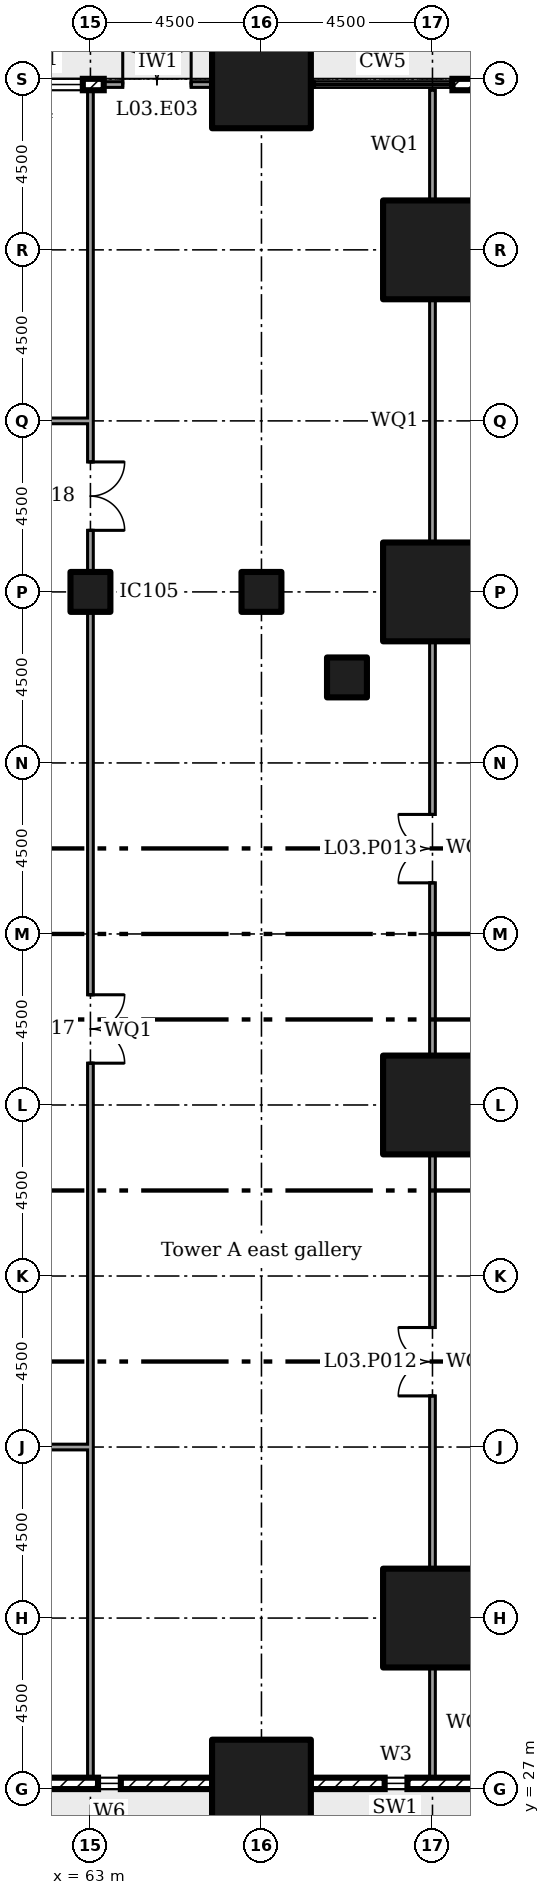
"""IFC4 building model, lengths in metres.
Left out: names, types, materials, properties, quantities, classifications, styles, units other than length and angle.
Written with IfcOpenShell. Run it as: python <this file> out.ifc"""

import sys

from ifc_helpers import new_model, si_unit, direction, frame, frame_2d, origin, origin_2d, place, context, subcontext, project, spatial, rectangle, extrude, element, fill, save


model = new_model("IFC4")
c1 = context("Model", 3, precision=1e-05, world=origin(), true_north=direction((0.0, 1.0)))
c2 = subcontext(c1, "Body", "Model", "MODEL_VIEW")
j1 = project(units=[si_unit("LENGTHUNIT", "METRE"), si_unit("PLANEANGLEUNIT", "RADIAN")], contexts=[c1])
p1 = place(None, origin())
s1 = spatial("IfcSite", under=j1, at=p1, CompositionType="ELEMENT")
p2 = place(p1, origin())
s2 = spatial("IfcBuilding", under=s1, at=p2, CompositionType="ELEMENT")
p3 = place(p2, frame((0.0, 0.0, 16.5)))
s3 = spatial("IfcBuildingStorey", under=s2, at=p3, CompositionType="ELEMENT", Elevation=16.5)
for number, where in (
    (1, (67.5, 27.0, 0.0)),
    (2, (67.5, 72.0, 0.0)),
    (3, (72.0, 31.5, 0.0)),
    (4, (72.0, 45.0, 0.0)),
    (5, (72.0, 58.5, 0.0)),
    (6, (72.0, 67.5, 0.0)),
):
    element("IfcColumn", number, at=place(p3, frame(where)), inside=s3, PredefinedType="COLUMN", context=c2, shape_type="SweptSolid", body=[
        extrude(rectangle(XDim=2.6, YDim=2.6, at=origin_2d()), origin(), (0.0, 0.0, 1.0), 4.5),
    ])
for number, where in (
    (7, (63.0, 58.5, 0.0)),
    (8, (67.5, 58.5, 0.0)),
    (9, (69.75, 56.25, 0.0)),
):
    element("IfcColumn", number, at=place(p3, frame(where)), inside=s3, PredefinedType="COLUMN", context=c2, shape_type="SweptSolid", body=[
        extrude(rectangle(XDim=1.05, YDim=1.05, at=origin_2d()), origin(), (0.0, 0.0, 1.0), 4.5),
    ])
p4 = place(p3, frame((59.8, 27.15, 0.0)))
e10 = element("IfcWall", 10, at=p4, inside=s3, PredefinedType="ELEMENTEDWALL", context=c2, shape_type="SweptSolid", body=[
    extrude(rectangle(XDim=6.4, YDim=0.3, at=frame_2d((3.2, 0.0))), origin(), (0.0, 0.0, 1.0), 2.25),
])
p5 = place(p4, frame((3.4, 0.0, 0.45)))
e11 = element("IfcOpeningElement", 11, at=p5, cuts=e10, PredefinedType="OPENING", context=c2, shape_type="SweptSolid", body=[
    extrude(rectangle(XDim=0.6, YDim=1.7, at=frame_2d((0.3, 0.85))), frame((0.0, 0.16, 0.0), z_axis=(0.0, -1.0, 0.0), x_axis=(1.0, 0.0, 0.0)), (0.0, 0.0, 1.0), 0.32),
])
p6 = place(p3, frame((68.8, 27.15, 0.0)))
e12 = element("IfcWall", 12, at=p6, inside=s3, PredefinedType="ELEMENTEDWALL", context=c2, shape_type="SweptSolid", body=[
    extrude(rectangle(XDim=4.433, YDim=0.3, at=frame_2d((2.217, 0.0))), origin(), (0.0, 0.0, 1.0), 4.05),
])
p7 = place(p6, frame((1.942, 0.0, 0.45)))
e13 = element("IfcOpeningElement", 13, at=p7, cuts=e12, PredefinedType="OPENING", context=c2, shape_type="SweptSolid", body=[
    extrude(rectangle(XDim=0.6, YDim=2.4, at=frame_2d((0.3, 1.2))), frame((0.0, 0.16, 0.0), z_axis=(0.0, -1.0, 0.0), x_axis=(1.0, 0.0, 0.0)), (0.0, 0.0, 1.0), 0.32),
])
p8 = place(p3, frame((76.2, 71.85, 0.0), z_axis=(0.0, 0.0, 1.0), x_axis=(-1.0, 0.0, 0.0)))
e14 = element("IfcWall", 14, at=p8, inside=s3, PredefinedType="ELEMENTEDWALL", context=c2, shape_type="SweptSolid", body=[
    extrude(rectangle(XDim=3.675, YDim=0.3, at=frame_2d((1.837, 0.0))), origin(), (0.0, 0.0, 1.0), 4.05),
])
p9 = place(p8, frame((1.538, 0.0, 0.45)))
e15 = element("IfcOpeningElement", 15, at=p9, cuts=e14, PredefinedType="OPENING", context=c2, shape_type="SweptSolid", body=[
    extrude(rectangle(XDim=0.6, YDim=2.4, at=frame_2d((0.3, 1.2))), frame((0.0, 0.16, 0.0), z_axis=(0.0, -1.0, 0.0), x_axis=(1.0, 0.0, 0.0)), (0.0, 0.0, 1.0), 0.32),
])
p10 = place(p3, frame((66.2, 71.85, 0.0), z_axis=(0.0, 0.0, 1.0), x_axis=(-1.0, 0.0, 0.0)))
e16 = element("IfcWall", 16, at=p10, inside=s3, PredefinedType="SOLIDWALL", context=c2, shape_type="SweptSolid", body=[
    extrude(rectangle(XDim=2.85, YDim=0.15, at=frame_2d((1.425, 0.0))), origin(), (0.0, 0.0, 1.0), 2.25),
])
p11 = place(p10, frame((0.55, 0.0, 0.0)))
e17 = element("IfcOpeningElement", 17, at=p11, cuts=e16, PredefinedType="OPENING", context=c2, shape_type="SweptSolid", body=[
    extrude(rectangle(XDim=1.8, YDim=2.1, at=frame_2d((0.9, 1.05))), frame((0.0, 0.085, 0.0), z_axis=(0.0, -1.0, 0.0), x_axis=(1.0, 0.0, 0.0)), (0.0, 0.0, 1.0), 0.17),
])
p12 = place(p3, frame((63.35, 71.85, 0.0), z_axis=(0.0, 0.0, 1.0), x_axis=(-1.0, 0.0, 0.0)))
e18 = element("IfcWall", 18, at=p12, inside=s3, PredefinedType="ELEMENTEDWALL", context=c2, shape_type="SweptSolid", body=[
    extrude(rectangle(XDim=3.55, YDim=0.3, at=frame_2d((1.775, 0.0))), origin(), (0.0, 0.0, 1.0), 2.25),
])
p13 = place(p12, frame((0.55, 0.0, 0.45)))
e19 = element("IfcOpeningElement", 19, at=p13, cuts=e18, PredefinedType="OPENING", context=c2, shape_type="SweptSolid", body=[
    extrude(rectangle(XDim=2.4, YDim=1.7, at=frame_2d((1.2, 0.85))), frame((0.0, 0.16, 0.0), z_axis=(0.0, -1.0, 0.0), x_axis=(1.0, 0.0, 0.0)), (0.0, 0.0, 1.0), 0.32),
])
p14 = place(p3, frame((72.0, 27.3, 0.0), z_axis=(0.0, 0.0, 1.0), x_axis=(0.0, 1.0, 0.0)))
e20 = element("IfcWall", 20, at=p14, inside=s3, PredefinedType="PARTITIONING", context=c2, shape_type="SweptSolid", body=[
    extrude(rectangle(XDim=2.905, YDim=0.15, at=frame_2d((1.453, 0.0))), origin(), (0.0, 0.0, 1.0), 4.05),
])
p15 = place(p3, frame((72.0, 32.795, 0.0), z_axis=(0.0, 0.0, 1.0), x_axis=(0.0, 1.0, 0.0)))
e21 = element("IfcWall", 21, at=p15, inside=s3, PredefinedType="PARTITIONING", context=c2, shape_type="SweptSolid", body=[
    extrude(rectangle(XDim=10.91, YDim=0.15, at=frame_2d((5.455, 0.0))), origin(), (0.0, 0.0, 1.0), 2.25),
])
p16 = place(p15, frame((4.55, 0.0, 0.0)))
e22 = element("IfcOpeningElement", 22, at=p16, cuts=e21, PredefinedType="OPENING", context=c2, shape_type="SweptSolid", body=[
    extrude(rectangle(XDim=1.8, YDim=2.1, at=frame_2d((0.9, 1.05))), frame((0.0, 0.085, 0.0), z_axis=(0.0, -1.0, 0.0), x_axis=(1.0, 0.0, 0.0)), (0.0, 0.0, 1.0), 0.17),
])
p17 = place(p3, frame((72.0, 46.295, 0.0), z_axis=(0.0, 0.0, 1.0), x_axis=(0.0, 1.0, 0.0)))
e23 = element("IfcWall", 23, at=p17, inside=s3, PredefinedType="PARTITIONING", context=c2, shape_type="SweptSolid", body=[
    extrude(rectangle(XDim=10.91, YDim=0.15, at=frame_2d((5.455, 0.0))), origin(), (0.0, 0.0, 1.0), 2.25),
])
p18 = place(p17, frame((4.55, 0.0, 0.0)))
e24 = element("IfcOpeningElement", 24, at=p18, cuts=e23, PredefinedType="OPENING", context=c2, shape_type="SweptSolid", body=[
    extrude(rectangle(XDim=1.8, YDim=2.1, at=frame_2d((0.9, 1.05))), frame((0.0, 0.085, 0.0), z_axis=(0.0, -1.0, 0.0), x_axis=(1.0, 0.0, 0.0)), (0.0, 0.0, 1.0), 0.17),
])
p19 = place(p3, frame((72.0, 59.795, 0.0), z_axis=(0.0, 0.0, 1.0), x_axis=(0.0, 1.0, 0.0)))
e25 = element("IfcWall", 25, at=p19, inside=s3, PredefinedType="PARTITIONING", context=c2, shape_type="SweptSolid", body=[
    extrude(rectangle(XDim=6.41, YDim=0.15, at=frame_2d((3.205, 0.0))), origin(), (0.0, 0.0, 1.0), 2.25),
])
p20 = place(p3, frame((72.0, 68.795, 0.0), z_axis=(0.0, 0.0, 1.0), x_axis=(0.0, 1.0, 0.0)))
e26 = element("IfcWall", 26, at=p20, inside=s3, PredefinedType="PARTITIONING", context=c2, shape_type="SweptSolid", body=[
    extrude(rectangle(XDim=2.905, YDim=0.15, at=frame_2d((1.453, 0.0))), origin(), (0.0, 0.0, 1.0), 4.05),
])
p21 = place(p3, frame((63.0, 35.925, 0.0), z_axis=(0.0, 0.0, 1.0), x_axis=(0.0, 1.0, 0.0)))
e27 = element("IfcWall", 27, at=p21, inside=s3, PredefinedType="PARTITIONING", context=c2, shape_type="SweptSolid", body=[
    extrude(rectangle(XDim=22.055, YDim=0.15, at=frame_2d((11.027, 0.0))), origin(), (0.0, 0.0, 1.0), 4.05),
])
p22 = place(p21, frame((10.175, 0.0, 0.0)))
e28 = element("IfcOpeningElement", 28, at=p22, cuts=e27, PredefinedType="OPENING", context=c2, shape_type="SweptSolid", body=[
    extrude(rectangle(XDim=1.8, YDim=2.1, at=frame_2d((0.9, 1.05))), frame((0.0, 0.085, 0.0), z_axis=(0.0, -1.0, 0.0), x_axis=(1.0, 0.0, 0.0)), (0.0, 0.0, 1.0), 0.17),
])
p23 = place(p3, frame((63.0, 59.02, 0.0), z_axis=(0.0, 0.0, 1.0), x_axis=(0.0, 1.0, 0.0)))
e29 = element("IfcWall", 29, at=p23, inside=s3, PredefinedType="PARTITIONING", context=c2, shape_type="SweptSolid", body=[
    extrude(rectangle(XDim=4.055, YDim=0.15, at=frame_2d((2.027, 0.0))), origin(), (0.0, 0.0, 1.0), 4.05),
])
p24 = place(p23, frame((1.1, 0.0, 0.0)))
e30 = element("IfcOpeningElement", 30, at=p24, cuts=e29, PredefinedType="OPENING", context=c2, shape_type="SweptSolid", body=[
    extrude(rectangle(XDim=1.8, YDim=2.1, at=frame_2d((0.9, 1.05))), frame((0.0, 0.085, 0.0), z_axis=(0.0, -1.0, 0.0), x_axis=(1.0, 0.0, 0.0)), (0.0, 0.0, 1.0), 0.17),
])
for number, where, z_axis, x_axis in (
    (31, (63.0, 27.3, 0.0), (0.0, 0.0, 1.0), (0.0, 1.0, 0.0)),
    (32, (63.0, 63.0, 0.0), (0.0, 0.0, 1.0), (0.0, 1.0, 0.0)),
):
    element("IfcWall", number, at=place(p3, frame(where, z_axis=z_axis, x_axis=x_axis)), inside=s3, PredefinedType="PARTITIONING", context=c2, shape_type="SweptSolid", body=[
        extrude(rectangle(XDim=8.7, YDim=0.15, at=frame_2d((4.35, 0.0))), origin(), (0.0, 0.0, 1.0), 4.05),
    ])
p25 = place(p3, frame((59.02, 36.0, 0.0)))
e33 = element("IfcWall", 33, at=p25, inside=s3, PredefinedType="PARTITIONING", context=c2, shape_type="SweptSolid", body=[
    extrude(rectangle(XDim=3.905, YDim=0.15, at=frame_2d((1.953, 0.0))), origin(), (0.0, 0.0, 1.0), 4.05),
])
p26 = place(p3, frame((51.0, 63.0, 0.0)))
e34 = element("IfcWall", 34, at=p26, inside=s3, PredefinedType="PARTITIONING", context=c2, shape_type="SweptSolid", body=[
    extrude(rectangle(XDim=11.925, YDim=0.15, at=frame_2d((5.962, 0.0))), origin(), (0.0, 0.0, 1.0), 4.05),
])
p27 = place(p26, frame((5.5, 0.0, 0.0)))
e35 = element("IfcOpeningElement", 35, at=p27, cuts=e34, PredefinedType="OPENING", context=c2, shape_type="SweptSolid", body=[
    extrude(rectangle(XDim=1.0, YDim=2.1, at=frame_2d((0.5, 1.05))), frame((0.0, 0.085, 0.0), z_axis=(0.0, -1.0, 0.0), x_axis=(1.0, 0.0, 0.0)), (0.0, 0.0, 1.0), 0.17),
])
p28 = place(p5, origin())
e36 = element("IfcWindow", 36, at=p28, inside=s3, PartitioningType="SINGLE_PANEL", PredefinedType="WINDOW", context=c2, shape_type="SweptSolid", body=[
    extrude(rectangle(XDim=0.6, YDim=1.7, at=frame_2d((0.3, 0.85))), frame((0.0, 0.03, 0.0), z_axis=(0.0, -1.0, 0.0), x_axis=(1.0, 0.0, 0.0)), (0.0, 0.0, 1.0), 0.06),
])
fill(e11, e36)
p29 = place(p7, origin())
e37 = element("IfcWindow", 37, at=p29, inside=s3, PartitioningType="SINGLE_PANEL", PredefinedType="WINDOW", context=c2, shape_type="SweptSolid", body=[
    extrude(rectangle(XDim=0.6, YDim=2.4, at=frame_2d((0.3, 1.2))), frame((0.0, 0.03, 0.0), z_axis=(0.0, -1.0, 0.0), x_axis=(1.0, 0.0, 0.0)), (0.0, 0.0, 1.0), 0.06),
])
fill(e13, e37)
p30 = place(p11, frame((1.8, 0.0, 0.0), x_axis=(-1.0, 0.0, 0.0)))
e38 = element("IfcDoor", 38, at=p30, inside=s3, OperationType="DOUBLE_DOOR_DOUBLE_SWING", PredefinedType="NOTDEFINED", context=c2, shape_type="SweptSolid", body=[
    extrude(rectangle(XDim=1.8, YDim=2.1, at=frame_2d((0.9, 1.05))), frame((0.0, 0.025, 0.0), z_axis=(0.0, -1.0, 0.0), x_axis=(1.0, 0.0, 0.0)), (0.0, 0.0, 1.0), 0.05),
])
fill(e17, e38)
p31 = place(p13, origin())
e39 = element("IfcWindow", 39, at=p31, inside=s3, PartitioningType="SINGLE_PANEL", PredefinedType="WINDOW", context=c2, shape_type="SweptSolid", body=[
    extrude(rectangle(XDim=2.4, YDim=1.7, at=frame_2d((1.2, 0.85))), frame((0.0, 0.03, 0.0), z_axis=(0.0, -1.0, 0.0), x_axis=(1.0, 0.0, 0.0)), (0.0, 0.0, 1.0), 0.06),
])
fill(e19, e39)
p32 = place(p16, origin())
e40 = element("IfcDoor", 40, at=p32, inside=s3, OperationType="DOUBLE_DOOR_SINGLE_SWING", PredefinedType="DOOR", context=c2, shape_type="SweptSolid", body=[
    extrude(rectangle(XDim=1.8, YDim=2.1, at=frame_2d((0.9, 1.05))), frame((0.0, 0.025, 0.0), z_axis=(0.0, -1.0, 0.0), x_axis=(1.0, 0.0, 0.0)), (0.0, 0.0, 1.0), 0.05),
])
fill(e22, e40)
p33 = place(p18, origin())
e41 = element("IfcDoor", 41, at=p33, inside=s3, OperationType="DOUBLE_DOOR_SINGLE_SWING", PredefinedType="DOOR", context=c2, shape_type="SweptSolid", body=[
    extrude(rectangle(XDim=1.8, YDim=2.1, at=frame_2d((0.9, 1.05))), frame((0.0, 0.025, 0.0), z_axis=(0.0, -1.0, 0.0), x_axis=(1.0, 0.0, 0.0)), (0.0, 0.0, 1.0), 0.05),
])
fill(e24, e41)
p34 = place(p22, frame((1.8, 0.0, 0.0), x_axis=(-1.0, 0.0, 0.0)))
e42 = element("IfcDoor", 42, at=p34, inside=s3, OperationType="DOUBLE_DOOR_SINGLE_SWING", PredefinedType="DOOR", context=c2, shape_type="SweptSolid", body=[
    extrude(rectangle(XDim=1.8, YDim=2.1, at=frame_2d((0.9, 1.05))), frame((0.0, 0.025, 0.0), z_axis=(0.0, -1.0, 0.0), x_axis=(1.0, 0.0, 0.0)), (0.0, 0.0, 1.0), 0.05),
])
fill(e28, e42)
p35 = place(p24, frame((1.8, 0.0, 0.0), x_axis=(-1.0, 0.0, 0.0)))
e43 = element("IfcDoor", 43, at=p35, inside=s3, OperationType="DOUBLE_DOOR_SINGLE_SWING", PredefinedType="DOOR", context=c2, shape_type="SweptSolid", body=[
    extrude(rectangle(XDim=1.8, YDim=2.1, at=frame_2d((0.9, 1.05))), frame((0.0, 0.025, 0.0), z_axis=(0.0, -1.0, 0.0), x_axis=(1.0, 0.0, 0.0)), (0.0, 0.0, 1.0), 0.05),
])
fill(e30, e43)
save(model, sys.argv[1])
